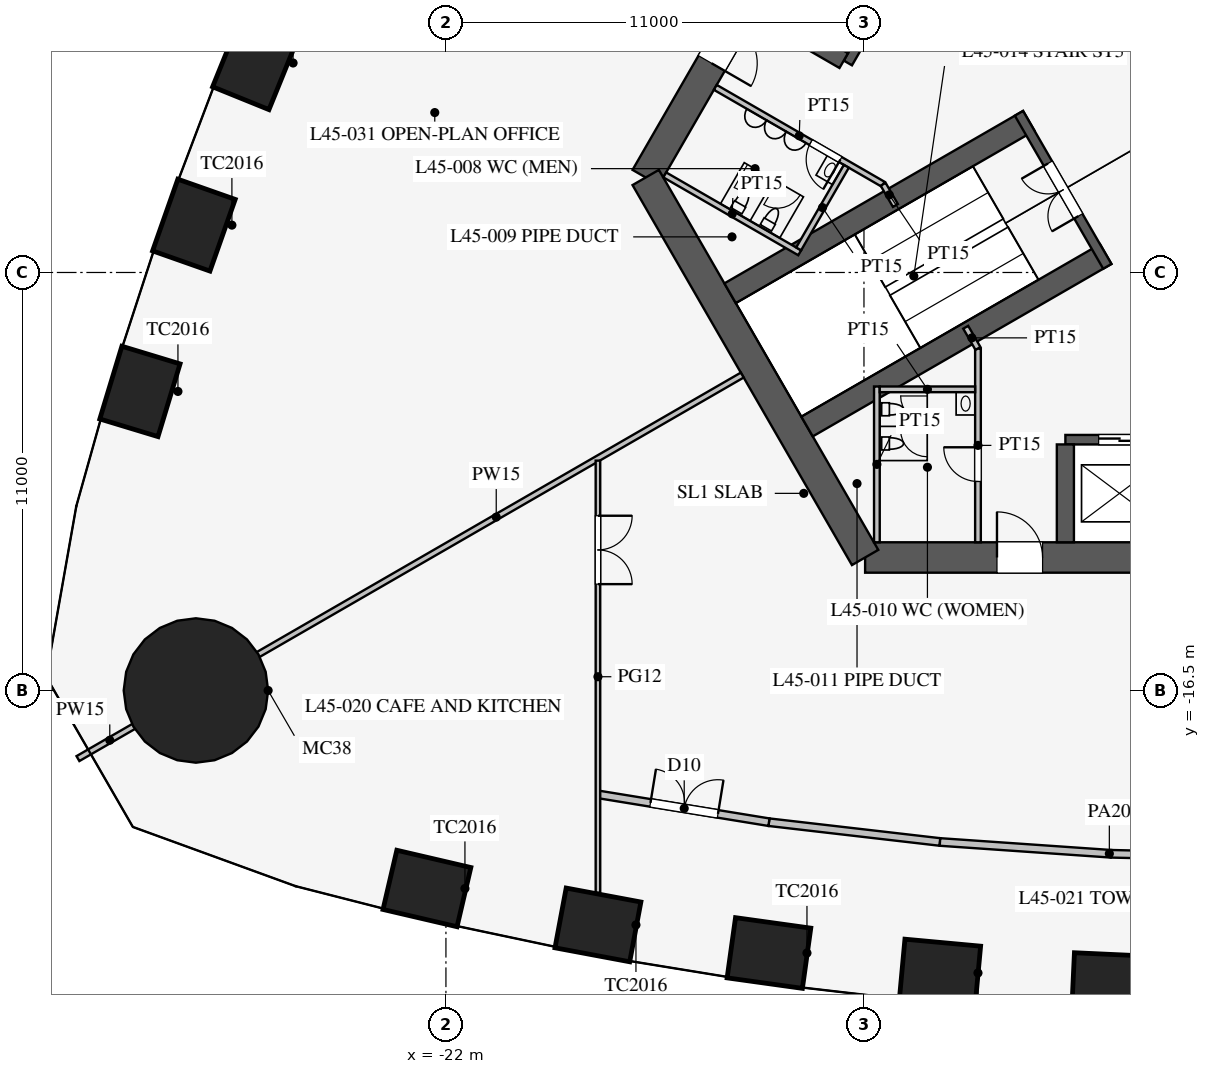
"""IFC4 building model, lengths in metres.
Left out: names, types, materials, properties, quantities, classifications, styles, units other than length and angle.
Written with IfcOpenShell. Run it as: python <this file> out.ifc"""

import sys

from ifc_helpers import new_model, si_unit, direction, frame, frame_2d, origin, origin_2d, place, context, subcontext, project, spatial, rectangle, circle, extrude, element, fill, save


model = new_model("IFC4")
c1 = context("Model", 3, precision=1e-05, world=origin(), true_north=direction((0.0, 1.0)))
c2 = subcontext(c1, "Body", "Model", "MODEL_VIEW")
j1 = project(units=[si_unit("LENGTHUNIT", "METRE"), si_unit("PLANEANGLEUNIT", "RADIAN")], contexts=[c1])
p1 = place(None, origin())
s1 = spatial("IfcSite", under=j1, at=p1, CompositionType="ELEMENT")
p2 = place(p1, origin())
s2 = spatial("IfcBuilding", under=s1, at=p2, CompositionType="ELEMENT")
p3 = place(p2, frame((0.0, 0.0, 198.1)))
s3 = spatial("IfcBuildingStorey", under=s2, at=p3, CompositionType="ELEMENT", Elevation=198.1)
for number, where, z_axis, x_axis in (
    (1, (-22.5, -21.71, 0.0), (0.0, 0.0, 1.0), (0.974, -0.227, 0.0)),
    (2, (-18.0, -22.669, 0.0), (0.0, 0.0, 1.0), (0.983, -0.184, 0.0)),
    (3, (-13.5, -23.408, 0.0), (0.0, 0.0, 1.0), (0.99, -0.138, 0.0)),
    (4, (-9.0, -23.933, 0.0), (0.0, 0.0, 1.0), (0.996, -0.092, 0.0)),
    (5, (-4.5, -24.246, 0.0), (0.0, 0.0, 1.0), (0.999, -0.046, 0.0)),
    (6, (-27.022, 0.013, 0.0), (0.0, 0.0, 1.0), (-0.376, -0.927, 0.0)),
    (7, (-28.632, -4.254, 0.0), (0.0, 0.0, 1.0), (-0.332, -0.943, 0.0)),
    (8, (-30.052, -8.63, 0.0), (0.0, 0.0, 1.0), (-0.29, -0.957, 0.0)),
):
    element("IfcColumn", number, at=place(p3, frame(where, z_axis=z_axis, x_axis=x_axis)), inside=s3, PredefinedType="COLUMN", context=c2, shape_type="SweptSolid", body=[
        extrude(rectangle(XDim=2.0, YDim=1.6, at=origin_2d()), origin(), (0.0, 0.0, 1.0), 4.2),
    ])
p4 = place(p3, frame((-28.579, -16.5, 0.0), z_axis=(0.0, 0.0, 1.0), x_axis=(1.0, 0.0, 0.0)))
e9 = element("IfcColumn", 9, at=p4, inside=s3, PredefinedType="COLUMN", context=c2, shape_type="SweptSolid", body=[
    extrude(circle(Radius=1.9, at=origin_2d()), origin(), (0.0, 0.0, 1.0), 4.2),
])
p5 = place(p3, frame((-10.97, -13.0, 0.0), z_axis=(0.0, 0.0, 1.0), x_axis=(1.0, 0.0, 0.0)))
e10 = element("IfcWall", 10, at=p5, inside=s3, PredefinedType="SHEAR", context=c2, shape_type="SweptSolid", body=[
    extrude(rectangle(XDim=21.939, YDim=0.8, at=frame_2d((10.97, 0.0))), origin(), (0.0, 0.0, 1.0), 4.2),
])
p6 = place(p5, frame((17.27, 0.0, 0.0)))
e11 = element("IfcOpeningElement", 11, at=p6, cuts=e10, PredefinedType="OPENING", context=c2, shape_type="SweptSolid", body=[
    extrude(rectangle(XDim=1.2, YDim=2.1, at=frame_2d((0.6, 1.05))), frame((0.0, 0.41, 0.0), z_axis=(0.0, -1.0, 0.0), x_axis=(1.0, 0.0, 0.0)), (0.0, 0.0, 1.0), 0.82),
])
p7 = place(p5, frame((3.47, 0.0, 0.0)))
e12 = element("IfcOpeningElement", 12, at=p7, cuts=e10, PredefinedType="OPENING", context=c2, shape_type="SweptSolid", body=[
    extrude(rectangle(XDim=1.2, YDim=2.1, at=frame_2d((0.6, 1.05))), frame((0.0, 0.41, 0.0), z_axis=(0.0, -1.0, 0.0), x_axis=(1.0, 0.0, 0.0)), (0.0, 0.0, 1.0), 0.82),
])
p8 = place(p3, frame((-5.773, 16.0, 0.0), z_axis=(0.0, 0.0, 1.0), x_axis=(-0.500002442456, -0.866023993627, 0.0)))
e13 = element("IfcWall", 13, at=p8, inside=s3, PredefinedType="SHEAR", context=c2, shape_type="SweptSolid", body=[
    extrude(rectangle(XDim=21.939, YDim=0.8, at=frame_2d((10.97, 0.0))), origin(), (0.0, 0.0, 1.0), 4.2),
])
p9 = place(p8, frame((17.27, 0.0, 0.0)))
e14 = element("IfcOpeningElement", 14, at=p9, cuts=e13, PredefinedType="OPENING", context=c2, shape_type="SweptSolid", body=[
    extrude(rectangle(XDim=1.2, YDim=2.1, at=frame_2d((0.6, 1.05))), frame((0.0, 0.41, 0.0), z_axis=(0.0, -1.0, 0.0), x_axis=(1.0, 0.0, 0.0)), (0.0, 0.0, 1.0), 0.82),
])
p10 = place(p8, frame((3.47, 0.0, 0.0)))
e15 = element("IfcOpeningElement", 15, at=p10, cuts=e13, PredefinedType="OPENING", context=c2, shape_type="SweptSolid", body=[
    extrude(rectangle(XDim=1.2, YDim=2.1, at=frame_2d((0.6, 1.05))), frame((0.0, 0.41, 0.0), z_axis=(0.0, -1.0, 0.0), x_axis=(1.0, 0.0, 0.0)), (0.0, 0.0, 1.0), 0.82),
])
p11 = place(p3, frame((-16.743, -3.0, 0.0), z_axis=(0.0, 0.0, 1.0), x_axis=(0.499995765644, -0.866027848477, 0.0)))
e16 = element("IfcWall", 16, at=p11, inside=s3, PredefinedType="SHEAR", context=c2, shape_type="SweptSolid", body=[
    extrude(rectangle(XDim=11.547, YDim=0.8, at=frame_2d((5.773, 0.0))), origin(), (0.0, 0.0, 1.0), 4.2),
])
p12 = place(p3, frame((-5.7, -9.9, 0.0), z_axis=(0.0, 0.0, 1.0), x_axis=(1.0, 0.0, 0.0)))
e17 = element("IfcWall", 17, at=p12, inside=s3, PredefinedType="SHEAR", context=c2, shape_type="SweptSolid", body=[
    extrude(rectangle(XDim=11.4, YDim=0.25, at=frame_2d((5.7, 0.0))), origin(), (0.0, 0.0, 1.0), 4.2),
])
p13 = place(p12, frame((0.875, 0.0, 0.0)))
e18 = element("IfcOpeningElement", 18, at=p13, cuts=e17, PredefinedType="OPENING", context=c2, shape_type="SweptSolid", body=[
    extrude(rectangle(XDim=1.1, YDim=2.2, at=frame_2d((0.55, 1.1))), frame((0.0, 0.135, 0.0), z_axis=(0.0, -1.0, 0.0), x_axis=(1.0, 0.0, 0.0)), (0.0, 0.0, 1.0), 0.27),
])
p14 = place(p12, frame((3.725, 0.0, 0.0)))
e19 = element("IfcOpeningElement", 19, at=p14, cuts=e17, PredefinedType="OPENING", context=c2, shape_type="SweptSolid", body=[
    extrude(rectangle(XDim=1.1, YDim=2.2, at=frame_2d((0.55, 1.1))), frame((0.0, 0.135, 0.0), z_axis=(0.0, -1.0, 0.0), x_axis=(1.0, 0.0, 0.0)), (0.0, 0.0, 1.0), 0.27),
])
p15 = place(p12, frame((6.575, 0.0, 0.0)))
e20 = element("IfcOpeningElement", 20, at=p15, cuts=e17, PredefinedType="OPENING", context=c2, shape_type="SweptSolid", body=[
    extrude(rectangle(XDim=1.1, YDim=2.2, at=frame_2d((0.55, 1.1))), frame((0.0, 0.135, 0.0), z_axis=(0.0, -1.0, 0.0), x_axis=(1.0, 0.0, 0.0)), (0.0, 0.0, 1.0), 0.27),
])
p16 = place(p12, frame((9.425, 0.0, 0.0)))
e21 = element("IfcOpeningElement", 21, at=p16, cuts=e17, PredefinedType="OPENING", context=c2, shape_type="SweptSolid", body=[
    extrude(rectangle(XDim=1.1, YDim=2.2, at=frame_2d((0.55, 1.1))), frame((0.0, 0.135, 0.0), z_axis=(0.0, -1.0, 0.0), x_axis=(1.0, 0.0, 0.0)), (0.0, 0.0, 1.0), 0.27),
])
p17 = place(p3, frame((-5.7, -10.025, 0.0), z_axis=(0.0, 0.0, 1.0), x_axis=(0.0, -1.0, 0.0)))
e22 = element("IfcWall", 22, at=p17, inside=s3, PredefinedType="SHEAR", context=c2, shape_type="SweptSolid", body=[
    extrude(rectangle(XDim=2.575, YDim=0.45, at=frame_2d((1.288, 0.0))), origin(), (0.0, 0.0, 1.0), 4.2),
])
p18 = place(p3, frame((-5.724, 9.886, 0.0), z_axis=(0.0, 0.0, 1.0), x_axis=(-0.500001763848, -0.866024385424, 0.0)))
e23 = element("IfcWall", 23, at=p18, inside=s3, PredefinedType="SHEAR", context=c2, shape_type="SweptSolid", body=[
    extrude(rectangle(XDim=11.4, YDim=0.25, at=frame_2d((5.7, 0.0))), origin(), (0.0, 0.0, 1.0), 4.2),
])
p19 = place(p18, frame((6.525, 0.0, 0.0)))
e24 = element("IfcOpeningElement", 24, at=p19, cuts=e23, PredefinedType="OPENING", context=c2, shape_type="SweptSolid", body=[
    extrude(rectangle(XDim=1.2, YDim=2.2, at=frame_2d((0.6, 1.1))), frame((0.0, 0.135, 0.0), z_axis=(0.0, -1.0, 0.0), x_axis=(1.0, 0.0, 0.0)), (0.0, 0.0, 1.0), 0.27),
])
p20 = place(p18, frame((9.375, 0.0, 0.0)))
e25 = element("IfcOpeningElement", 25, at=p20, cuts=e23, PredefinedType="OPENING", context=c2, shape_type="SweptSolid", body=[
    extrude(rectangle(XDim=1.2, YDim=2.2, at=frame_2d((0.6, 1.1))), frame((0.0, 0.135, 0.0), z_axis=(0.0, -1.0, 0.0), x_axis=(1.0, 0.0, 0.0)), (0.0, 0.0, 1.0), 0.27),
])
p21 = place(p3, frame((-11.532, 0.076, 0.0), z_axis=(0.0, 0.0, 1.0), x_axis=(-0.866005588531, 0.500034319456, 0.0)))
e26 = element("IfcWall", 26, at=p21, inside=s3, PredefinedType="SHEAR", context=c2, shape_type="SweptSolid", body=[
    extrude(rectangle(XDim=2.575, YDim=0.45, at=frame_2d((1.288, 0.0))), origin(), (0.0, 0.0, 1.0), 4.2),
])
for number, where, z_axis, x_axis in (
    (27, (-6.663, -1.509, 0.0), (0.0, 0.0, 1.0), (-0.866, -0.5, 0.0)),
    (28, (-4.638, -5.016, 0.0), (0.0, 0.0, 1.0), (-0.866, -0.5, 0.0)),
):
    element("IfcWall", number, at=place(p3, frame(where, z_axis=z_axis, x_axis=x_axis)), inside=s3, PredefinedType="SHEAR", context=c2, shape_type="SweptSolid", body=[
        extrude(rectangle(XDim=9.075, YDim=0.6, at=frame_2d((4.538, 0.0))), origin(), (0.0, 0.0, 1.0), 4.2),
    ])
p22 = place(p3, frame((-6.922, -1.312, 0.0), z_axis=(0.0, 0.0, 1.0), x_axis=(0.499984536904, -0.866034331223, 0.0)))
e29 = element("IfcWall", 29, at=p22, inside=s3, PredefinedType="SHEAR", context=c2, shape_type="SweptSolid", body=[
    extrude(rectangle(XDim=4.65, YDim=0.25, at=frame_2d((2.325, 0.0))), origin(), (0.0, 0.0, 1.0), 4.2),
])
p23 = place(p22, frame((1.525, 0.0, 0.0)))
e30 = element("IfcOpeningElement", 30, at=p23, cuts=e29, PredefinedType="OPENING", context=c2, shape_type="SweptSolid", body=[
    extrude(rectangle(XDim=1.6, YDim=2.1, at=frame_2d((0.8, 1.05))), frame((0.0, 0.135, 0.0), z_axis=(0.0, -1.0, 0.0), x_axis=(1.0, 0.0, 0.0)), (0.0, 0.0, 1.0), 0.27),
])
p24 = place(p3, frame((-8.0, -7.5, 0.0), z_axis=(0.0, 0.0, 1.0), x_axis=(0.0, -1.0, 0.0)))
e31 = element("IfcWall", 31, at=p24, inside=s3, PredefinedType="PARTITIONING", context=c2, shape_type="SweptSolid", body=[
    extrude(rectangle(XDim=5.1, YDim=0.15, at=frame_2d((2.55, 0.0))), origin(), (0.0, 0.0, 1.0), 4.0),
])
p25 = place(p24, frame((2.6, 0.0, 0.0)))
e32 = element("IfcOpeningElement", 32, at=p25, cuts=e31, PredefinedType="OPENING", context=c2, shape_type="SweptSolid", body=[
    extrude(rectangle(XDim=0.9, YDim=2.1, at=frame_2d((0.45, 1.05))), frame((0.0, 0.085, 0.0), z_axis=(0.0, -1.0, 0.0), x_axis=(1.0, 0.0, 0.0)), (0.0, 0.0, 1.0), 0.17),
])
p26 = place(p3, frame((-10.495, -3.178, 0.0), z_axis=(0.0, 0.0, 1.0), x_axis=(-0.86602216432, 0.500005610874, 0.0)))
e33 = element("IfcWall", 33, at=p26, inside=s3, PredefinedType="PARTITIONING", context=c2, shape_type="SweptSolid", body=[
    extrude(rectangle(XDim=5.1, YDim=0.15, at=frame_2d((2.55, 0.0))), origin(), (0.0, 0.0, 1.0), 4.0),
])
p27 = place(p26, frame((1.3, 0.0, 0.0)))
e34 = element("IfcOpeningElement", 34, at=p27, cuts=e33, PredefinedType="OPENING", context=c2, shape_type="SweptSolid", body=[
    extrude(rectangle(XDim=0.9, YDim=2.1, at=frame_2d((0.45, 1.05))), frame((0.0, 0.085, 0.0), z_axis=(0.0, -1.0, 0.0), x_axis=(1.0, 0.0, 0.0)), (0.0, 0.0, 1.0), 0.17),
])
for number, where, z_axis, x_axis in (
    (35, (-10.495, -3.178, 0.0), (0.0, 0.0, 1.0), (0.5, -0.866, 0.0)),
    (36, (-8.0, -7.5, 0.0), (0.0, 0.0, 1.0), (-0.5, 0.866, 0.0)),
):
    element("IfcWall", number, at=place(p3, frame(where, z_axis=z_axis, x_axis=x_axis)), inside=s3, PredefinedType="PARTITIONING", context=c2, shape_type="SweptSolid", body=[
        extrude(rectangle(XDim=0.645, YDim=0.15, at=frame_2d((0.323, 0.0))), origin(), (0.0, 0.0, 1.0), 4.0),
    ])
p28 = place(p3, frame((-12.691, -4.982, 0.0), z_axis=(0.0, 0.0, 1.0), x_axis=(-0.8660249478, 0.500000789788, 0.0)))
e37 = element("IfcWall", 37, at=p28, inside=s3, PredefinedType="PARTITIONING", context=c2, shape_type="SweptSolid", body=[
    extrude(rectangle(XDim=4.1, YDim=0.15, at=frame_2d((2.05, 0.0))), origin(), (0.0, 0.0, 1.0), 4.0),
])
p29 = place(p3, frame((-11.464, -2.706, 0.0), z_axis=(0.0, 0.0, 1.0), x_axis=(-0.50001992892, -0.866013897511, 0.0)))
e38 = element("IfcWall", 38, at=p29, inside=s3, PredefinedType="PARTITIONING", context=c2, shape_type="SweptSolid", body=[
    extrude(rectangle(XDim=2.51, YDim=0.15, at=frame_2d((1.255, 0.0))), origin(), (0.0, 0.0, 1.0), 4.0),
])
p30 = place(p3, frame((-10.66, -8.5, 0.0), z_axis=(0.0, 0.0, 1.0), x_axis=(0.0, -1.0, 0.0)))
e39 = element("IfcWall", 39, at=p30, inside=s3, PredefinedType="PARTITIONING", context=c2, shape_type="SweptSolid", body=[
    extrude(rectangle(XDim=4.1, YDim=0.15, at=frame_2d((2.05, 0.0))), origin(), (0.0, 0.0, 1.0), 4.0),
])
p31 = place(p3, frame((-8.075, -8.575, 0.0), z_axis=(0.0, 0.0, 1.0), x_axis=(-1.0, 0.0, 0.0)))
e40 = element("IfcWall", 40, at=p31, inside=s3, PredefinedType="PARTITIONING", context=c2, shape_type="SweptSolid", body=[
    extrude(rectangle(XDim=2.51, YDim=0.15, at=frame_2d((1.255, 0.0))), origin(), (0.0, 0.0, 1.0), 4.0),
])
p32 = place(p3, frame((-14.203, -8.2, 0.0), z_axis=(0.0, 0.0, 1.0), x_axis=(-0.866021600284, -0.500006587798, 0.0)))
e41 = element("IfcWall", 41, at=p32, inside=s3, PredefinedType="PARTITIONING", context=c2, shape_type="SweptSolid", body=[
    extrude(rectangle(XDim=14.95, YDim=0.15, at=frame_2d((7.475, 0.0))), origin(), (0.0, 0.0, 1.0), 2.4),
])
p33 = place(p3, frame((-30.008, -17.325, 0.0), z_axis=(0.0, 0.0, 1.0), x_axis=(-0.866013246922, -0.500021055713, 0.0)))
e42 = element("IfcWall", 42, at=p33, inside=s3, PredefinedType="PARTITIONING", context=c2, shape_type="SweptSolid", body=[
    extrude(rectangle(XDim=1.935, YDim=0.15, at=frame_2d((0.967, 0.0))), origin(), (0.0, 0.0, 1.0), 2.4),
])
p34 = place(p3, frame((-13.5, -19.966, 0.0), z_axis=(0.0, 0.0, 1.0), x_axis=(0.993382946625, -0.114849124309, 0.0)))
e43 = element("IfcWall", 43, at=p34, inside=s3, PredefinedType="PARTITIONING", context=c2, shape_type="SweptSolid", body=[
    extrude(rectangle(XDim=4.53, YDim=0.2, at=frame_2d((2.265, 0.0))), origin(), (0.0, 0.0, 1.0), 2.9),
])
p35 = place(p3, frame((-18.0, -19.233, 0.0), z_axis=(0.0, 0.0, 1.0), x_axis=(0.986986525477, -0.160802980469, 0.0)))
e44 = element("IfcWall", 44, at=p35, inside=s3, PredefinedType="PARTITIONING", context=c2, shape_type="SweptSolid", body=[
    extrude(rectangle(XDim=4.559, YDim=0.2, at=frame_2d((2.28, 0.0))), origin(), (0.0, 0.0, 1.0), 2.9),
])
p36 = place(p35, frame((1.4, 0.0, 0.15)))
e45 = element("IfcOpeningElement", 45, at=p36, cuts=e44, PredefinedType="OPENING", context=c2, shape_type="SweptSolid", body=[
    extrude(rectangle(XDim=1.8, YDim=2.1, at=frame_2d((0.9, 1.05))), frame((0.0, 0.11, 0.0), z_axis=(0.0, -1.0, 0.0), x_axis=(1.0, 0.0, 0.0)), (0.0, 0.0, 1.0), 0.22),
])
p37 = place(p3, frame((-4.5, -20.797, 0.0), z_axis=(0.0, 0.0, 1.0), x_axis=(0.99973552509, -0.022997388381, 0.0)))
e46 = element("IfcWall", 46, at=p37, inside=s3, PredefinedType="PARTITIONING", context=c2, shape_type="SweptSolid", body=[
    extrude(rectangle(XDim=4.501, YDim=0.2, at=frame_2d((2.25, 0.0))), origin(), (0.0, 0.0, 1.0), 2.9),
])
p38 = place(p3, frame((-9.0, -20.486, 0.0), z_axis=(0.0, 0.0, 1.0), x_axis=(0.997623533978, -0.068900540297, 0.0)))
e47 = element("IfcWall", 47, at=p38, inside=s3, PredefinedType="PARTITIONING", context=c2, shape_type="SweptSolid", body=[
    extrude(rectangle(XDim=4.511, YDim=0.2, at=frame_2d((2.255, 0.0))), origin(), (0.0, 0.0, 1.0), 2.9),
])
p39 = place(p3, frame((-18.0, -10.451, 0.0), z_axis=(0.0, 0.0, 1.0), x_axis=(0.0, -1.0, 0.0)))
e48 = element("IfcWall", 48, at=p39, inside=s3, PredefinedType="PARTITIONING", context=c2, shape_type="SweptSolid", body=[
    extrude(rectangle(XDim=11.374, YDim=0.12, at=frame_2d((5.687, 0.0))), origin(), (0.0, 0.0, 1.0), 2.8),
])
p40 = place(p39, frame((1.45, 0.0, 0.15)))
e49 = element("IfcOpeningElement", 49, at=p40, cuts=e48, PredefinedType="OPENING", context=c2, shape_type="SweptSolid", body=[
    extrude(rectangle(XDim=1.8, YDim=2.1, at=frame_2d((0.9, 1.05))), frame((0.0, 0.07, 0.0), z_axis=(0.0, -1.0, 0.0), x_axis=(1.0, 0.0, 0.0)), (0.0, 0.0, 1.0), 0.14),
])
p41 = place(p25, frame((0.9, 0.0, 0.0), z_axis=(0.0, 0.0, 1.0), x_axis=(-1.0, 0.0, 0.0)))
e50 = element("IfcDoor", 50, at=p41, inside=s3, OperationType="SINGLE_SWING_RIGHT", PredefinedType="DOOR", context=c2, shape_type="SweptSolid", body=[
    extrude(rectangle(XDim=0.9, YDim=2.1, at=frame_2d((0.45, 1.05))), frame((0.0, 0.025, 0.0), z_axis=(0.0, -1.0, 0.0), x_axis=(1.0, 0.0, 0.0)), (0.0, 0.0, 1.0), 0.05),
])
fill(e32, e50)
p42 = place(p27, origin())
e51 = element("IfcDoor", 51, at=p42, inside=s3, OperationType="SINGLE_SWING_LEFT", PredefinedType="DOOR", context=c2, shape_type="SweptSolid", body=[
    extrude(rectangle(XDim=0.9, YDim=2.1, at=frame_2d((0.45, 1.05))), frame((0.0, 0.025, 0.0), z_axis=(0.0, -1.0, 0.0), x_axis=(1.0, 0.0, 0.0)), (0.0, 0.0, 1.0), 0.05),
])
fill(e34, e51)
p43 = place(p23, frame((1.6, 0.0, 0.0), z_axis=(0.0, 0.0, 1.0), x_axis=(-1.0, 0.0, 0.0)))
e52 = element("IfcDoor", 52, at=p43, inside=s3, OperationType="DOUBLE_DOOR_SINGLE_SWING", PredefinedType="DOOR", context=c2, shape_type="SweptSolid", body=[
    extrude(rectangle(XDim=1.6, YDim=2.1, at=frame_2d((0.8, 1.05))), frame((0.0, 0.025, 0.0), z_axis=(0.0, -1.0, 0.0), x_axis=(1.0, 0.0, 0.0)), (0.0, 0.0, 1.0), 0.05),
])
fill(e30, e52)
p44 = place(p7, origin())
e53 = element("IfcDoor", 53, at=p44, inside=s3, OperationType="SINGLE_SWING_LEFT", PredefinedType="DOOR", context=c2, shape_type="SweptSolid", body=[
    extrude(rectangle(XDim=1.2, YDim=2.1, at=frame_2d((0.6, 1.05))), frame((0.0, 0.025, 0.0), z_axis=(0.0, -1.0, 0.0), x_axis=(1.0, 0.0, 0.0)), (0.0, 0.0, 1.0), 0.05),
])
fill(e12, e53)
p45 = place(p9, origin())
e54 = element("IfcDoor", 54, at=p45, inside=s3, OperationType="SINGLE_SWING_RIGHT", PredefinedType="DOOR", context=c2, shape_type="SweptSolid", body=[
    extrude(rectangle(XDim=1.2, YDim=2.1, at=frame_2d((0.6, 1.05))), frame((0.0, 0.025, 0.0), z_axis=(0.0, -1.0, 0.0), x_axis=(1.0, 0.0, 0.0)), (0.0, 0.0, 1.0), 0.05),
])
fill(e14, e54)
p46 = place(p40, origin())
e55 = element("IfcDoor", 55, at=p46, inside=s3, OperationType="DOUBLE_DOOR_SINGLE_SWING", PredefinedType="DOOR", context=c2, shape_type="SweptSolid", body=[
    extrude(rectangle(XDim=1.8, YDim=2.1, at=frame_2d((0.9, 1.05))), frame((0.0, 0.025, 0.0), z_axis=(0.0, -1.0, 0.0), x_axis=(1.0, 0.0, 0.0)), (0.0, 0.0, 1.0), 0.05),
])
fill(e49, e55)
p47 = place(p36, origin())
e56 = element("IfcDoor", 56, at=p47, inside=s3, OperationType="DOUBLE_DOOR_SINGLE_SWING", PredefinedType="DOOR", context=c2, shape_type="SweptSolid", body=[
    extrude(rectangle(XDim=1.8, YDim=2.1, at=frame_2d((0.9, 1.05))), frame((0.0, 0.025, 0.0), z_axis=(0.0, -1.0, 0.0), x_axis=(1.0, 0.0, 0.0)), (0.0, 0.0, 1.0), 0.05),
])
fill(e45, e56)
p48 = place(p13, origin())
e57 = element("IfcDoor", 57, at=p48, inside=s3, OperationType="DOUBLE_DOOR_SLIDING", PredefinedType="DOOR", context=c2, shape_type="SweptSolid", body=[
    extrude(rectangle(XDim=1.1, YDim=2.2, at=frame_2d((0.55, 1.1))), frame((0.0, 0.025, 0.0), z_axis=(0.0, -1.0, 0.0), x_axis=(1.0, 0.0, 0.0)), (0.0, 0.0, 1.0), 0.05),
])
fill(e18, e57)
save(model, sys.argv[1])
